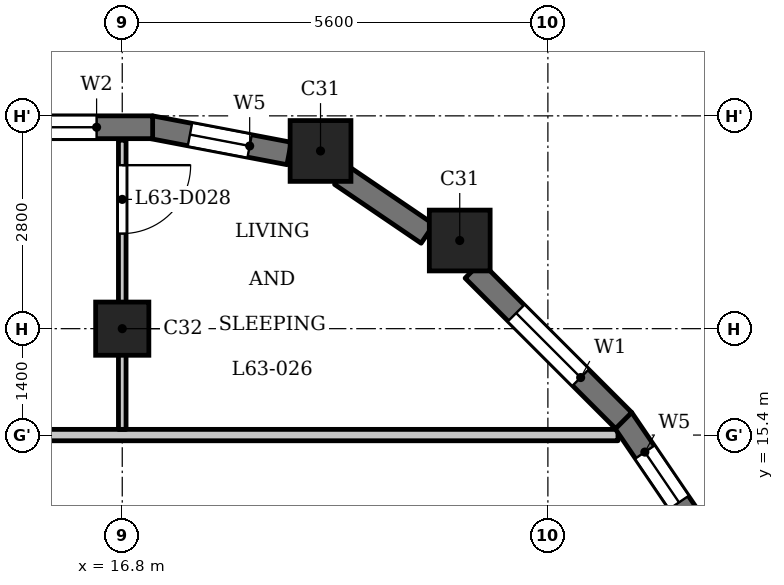
"""IFC4 building model, lengths in metres.
Left out: names, types, materials, properties, quantities, classifications, styles, units other than length and angle.
Written with IfcOpenShell. Run it as: python <this file> out.ifc"""

import sys

from ifc_helpers import new_model, si_unit, direction, frame, frame_2d, origin, origin_2d, place, context, subcontext, project, spatial, rectangle, extrude, element, fill, save


model = new_model("IFC4")
c1 = context("Model", 3, precision=1e-05, world=origin(), true_north=direction((0.0, 1.0)))
c2 = subcontext(c1, "Body", "Model", "MODEL_VIEW")
j1 = project(units=[si_unit("LENGTHUNIT", "METRE"), si_unit("PLANEANGLEUNIT", "RADIAN")], contexts=[c1])
p1 = place(None, origin())
s1 = spatial("IfcSite", under=j1, at=p1, CompositionType="ELEMENT")
p2 = place(p1, origin())
s2 = spatial("IfcBuilding", under=s1, at=p2, CompositionType="ELEMENT")
p3 = place(p2, frame((0.0, 0.0, 245.2)))
s3 = spatial("IfcBuildingStorey", under=s2, at=p3, CompositionType="ELEMENT", Elevation=245.2)
for number, where, z_axis, x_axis in (
    (1, (21.24, 17.96, 0.0), (0.0, 0.0, 1.0), (1.0, 0.0, 0.0)),
    (2, (19.409, 19.138, 0.0), (0.0, 0.0, 1.0), (1.0, 0.0, 0.0)),
):
    element("IfcColumn", number, at=place(p3, frame(where, z_axis=z_axis, x_axis=x_axis)), inside=s3, PredefinedType="COLUMN", context=c2, shape_type="SweptSolid", body=[
        extrude(rectangle(XDim=0.8, YDim=0.8, at=origin_2d()), origin(), (0.0, 0.0, 1.0), 3.5),
    ])
p4 = place(p3, frame((16.8, 16.8, 0.0), z_axis=(0.0, 0.0, 1.0), x_axis=(1.0, 0.0, 0.0)))
e3 = element("IfcColumn", 3, at=p4, inside=s3, PredefinedType="COLUMN", context=c2, shape_type="SweptSolid", body=[
    extrude(rectangle(XDim=0.7, YDim=0.7, at=origin_2d()), origin(), (0.0, 0.0, 1.0), 3.5),
])
p5 = place(p3, frame((24.422, 14.078, 0.0), z_axis=(0.0, 0.0, 1.0), x_axis=(-0.562054549384, 0.827100165347, 0.0)))
e4 = element("IfcWall", 4, at=p5, inside=s3, PredefinedType="SOLIDWALL", context=c2, shape_type="SweptSolid", body=[
    extrude(rectangle(XDim=1.856, YDim=0.3, at=frame_2d((0.928, 0.0))), origin(), (0.0, 0.0, 1.0), 2.55),
])
p6 = place(p5, frame((0.528, 0.0, 0.6)))
e5 = element("IfcOpeningElement", 5, at=p6, cuts=e4, PredefinedType="OPENING", context=c2, shape_type="SweptSolid", body=[
    extrude(rectangle(XDim=0.8, YDim=1.55, at=frame_2d((0.4, 0.775))), frame((0.0, 0.16, 0.0), z_axis=(0.0, -1.0, 0.0), x_axis=(1.0, 0.0, 0.0)), (0.0, 0.0, 1.0), 0.32),
])
p7 = place(p3, frame((23.397, 15.591, 0.0), z_axis=(0.0, 0.0, 1.0), x_axis=(-0.707150377276, 0.707063182409, 0.0)))
e6 = element("IfcWall", 6, at=p7, inside=s3, PredefinedType="SOLIDWALL", context=c2, shape_type="SweptSolid", body=[
    extrude(rectangle(XDim=2.8, YDim=0.3, at=frame_2d((1.4, 0.0))), origin(), (0.0, 0.0, 1.0), 2.55),
])
p8 = place(p7, frame((0.8, 0.0, 0.6)))
e7 = element("IfcOpeningElement", 7, at=p8, cuts=e6, PredefinedType="OPENING", context=c2, shape_type="SweptSolid", body=[
    extrude(rectangle(XDim=1.2, YDim=1.55, at=frame_2d((0.6, 0.775))), frame((0.0, 0.16, 0.0), z_axis=(0.0, -1.0, 0.0), x_axis=(1.0, 0.0, 0.0)), (0.0, 0.0, 1.0), 0.32),
])
p9 = place(p3, frame((20.817, 18.048, 0.0), z_axis=(0.0, 0.0, 1.0), x_axis=(-0.827025410886, 0.562164539747, 0.0)))
e8 = element("IfcWall", 8, at=p9, inside=s3, PredefinedType="SOLIDWALL", context=c2, shape_type="SweptSolid", body=[
    extrude(rectangle(XDim=1.377, YDim=0.3, at=frame_2d((0.688, 0.0))), origin(), (0.0, 0.0, 1.0), 2.55),
])
p10 = place(p3, frame((18.995, 19.105, 0.0), z_axis=(0.0, 0.0, 1.0), x_axis=(-0.982301706131, 0.187305520826, 0.0)))
e9 = element("IfcWall", 9, at=p10, inside=s3, PredefinedType="SOLIDWALL", context=c2, shape_type="SweptSolid", body=[
    extrude(rectangle(XDim=1.856, YDim=0.3, at=frame_2d((0.928, 0.0))), origin(), (0.0, 0.0, 1.0), 2.55),
])
p11 = place(p10, frame((0.528, 0.0, 0.6)))
e10 = element("IfcOpeningElement", 10, at=p11, cuts=e9, PredefinedType="OPENING", context=c2, shape_type="SweptSolid", body=[
    extrude(rectangle(XDim=0.8, YDim=1.55, at=frame_2d((0.4, 0.775))), frame((0.0, 0.16, 0.0), z_axis=(0.0, -1.0, 0.0), x_axis=(1.0, 0.0, 0.0)), (0.0, 0.0, 1.0), 0.32),
])
p12 = place(p3, frame((17.2, 19.45, 0.0), z_axis=(0.0, 0.0, 1.0), x_axis=(-1.0, 0.0, 0.0)))
e11 = element("IfcWall", 11, at=p12, inside=s3, PredefinedType="SOLIDWALL", context=c2, shape_type="SweptSolid", body=[
    extrude(rectangle(XDim=2.8, YDim=0.3, at=frame_2d((1.4, 0.0))), origin(), (0.0, 0.0, 1.0), 2.55),
])
p13 = place(p12, frame((0.738, 0.0, 0.9)))
e12 = element("IfcOpeningElement", 12, at=p13, cuts=e11, PredefinedType="OPENING", context=c2, shape_type="SweptSolid", body=[
    extrude(rectangle(XDim=1.8, YDim=1.25, at=frame_2d((0.9, 0.625))), frame((0.0, 0.16, 0.0), z_axis=(0.0, -1.0, 0.0), x_axis=(1.0, 0.0, 0.0)), (0.0, 0.0, 1.0), 0.32),
])
p14 = place(p3, frame((-23.55, 15.4, 0.0), z_axis=(0.0, 0.0, 1.0), x_axis=(1.0, 0.0, 0.0)))
e13 = element("IfcWall", 13, at=p14, inside=s3, PredefinedType="PARTITIONING", context=c2, shape_type="SweptSolid", body=[
    extrude(rectangle(XDim=46.872, YDim=0.15, at=frame_2d((23.436, 0.0))), origin(), (0.0, 0.0, 1.0), 3.2),
])
p15 = place(p14, frame((12.9, 0.0, 0.0)))
e14 = element("IfcOpeningElement", 14, at=p15, cuts=e13, PredefinedType="OPENING", context=c2, shape_type="SweptSolid", body=[
    extrude(rectangle(XDim=1.0, YDim=2.1, at=frame_2d((0.5, 1.05))), frame((0.0, 0.085, 0.0), z_axis=(0.0, -1.0, 0.0), x_axis=(1.0, 0.0, 0.0)), (0.0, 0.0, 1.0), 0.17),
])
p16 = place(p14, frame((20.9, 0.0, 0.0)))
e15 = element("IfcOpeningElement", 15, at=p16, cuts=e13, PredefinedType="OPENING", context=c2, shape_type="SweptSolid", body=[
    extrude(rectangle(XDim=1.0, YDim=2.1, at=frame_2d((0.5, 1.05))), frame((0.0, 0.085, 0.0), z_axis=(0.0, -1.0, 0.0), x_axis=(1.0, 0.0, 0.0)), (0.0, 0.0, 1.0), 0.17),
])
p17 = place(p14, frame((37.7, 0.0, 0.0)))
e16 = element("IfcOpeningElement", 16, at=p17, cuts=e13, PredefinedType="OPENING", context=c2, shape_type="SweptSolid", body=[
    extrude(rectangle(XDim=1.0, YDim=2.1, at=frame_2d((0.5, 1.05))), frame((0.0, 0.085, 0.0), z_axis=(0.0, -1.0, 0.0), x_axis=(1.0, 0.0, 0.0)), (0.0, 0.0, 1.0), 0.17),
])
p18 = place(p3, frame((16.8, 15.475, 0.0), z_axis=(0.0, 0.0, 1.0), x_axis=(0.0, 1.0, 0.0)))
e17 = element("IfcWall", 17, at=p18, inside=s3, PredefinedType="PARTITIONING", context=c2, shape_type="SweptSolid", body=[
    extrude(rectangle(XDim=3.805, YDim=0.1, at=frame_2d((1.902, 0.0))), origin(), (0.0, 0.0, 1.0), 3.2),
])
p19 = place(p18, frame((2.576, 0.0, 0.0)))
e18 = element("IfcOpeningElement", 18, at=p19, cuts=e17, PredefinedType="OPENING", context=c2, shape_type="SweptSolid", body=[
    extrude(rectangle(XDim=0.9, YDim=2.1, at=frame_2d((0.45, 1.05))), frame((0.0, 0.06, 0.0), z_axis=(0.0, -1.0, 0.0), x_axis=(1.0, 0.0, 0.0)), (0.0, 0.0, 1.0), 0.12),
])
p20 = place(p19, origin())
e19 = element("IfcDoor", 19, at=p20, inside=s3, OperationType="SINGLE_SWING_RIGHT", PredefinedType="DOOR", context=c2, shape_type="SweptSolid", body=[
    extrude(rectangle(XDim=0.9, YDim=2.1, at=frame_2d((0.45, 1.05))), frame((0.0, 0.025, 0.0), z_axis=(0.0, -1.0, 0.0), x_axis=(1.0, 0.0, 0.0)), (0.0, 0.0, 1.0), 0.05),
])
fill(e18, e19)
p21 = place(p6, origin())
e20 = element("IfcWindow", 20, at=p21, inside=s3, PartitioningType="SINGLE_PANEL", PredefinedType="WINDOW", context=c2, shape_type="SweptSolid", body=[
    extrude(rectangle(XDim=0.8, YDim=1.55, at=frame_2d((0.4, 0.775))), frame((0.0, 0.03, 0.0), z_axis=(0.0, -1.0, 0.0), x_axis=(1.0, 0.0, 0.0)), (0.0, 0.0, 1.0), 0.06),
])
fill(e5, e20)
p22 = place(p8, origin())
e21 = element("IfcWindow", 21, at=p22, inside=s3, PartitioningType="SINGLE_PANEL", PredefinedType="WINDOW", context=c2, shape_type="SweptSolid", body=[
    extrude(rectangle(XDim=1.2, YDim=1.55, at=frame_2d((0.6, 0.775))), frame((0.0, 0.03, 0.0), z_axis=(0.0, -1.0, 0.0), x_axis=(1.0, 0.0, 0.0)), (0.0, 0.0, 1.0), 0.06),
])
fill(e7, e21)
p23 = place(p11, origin())
e22 = element("IfcWindow", 22, at=p23, inside=s3, PartitioningType="SINGLE_PANEL", PredefinedType="WINDOW", context=c2, shape_type="SweptSolid", body=[
    extrude(rectangle(XDim=0.8, YDim=1.55, at=frame_2d((0.4, 0.775))), frame((0.0, 0.03, 0.0), z_axis=(0.0, -1.0, 0.0), x_axis=(1.0, 0.0, 0.0)), (0.0, 0.0, 1.0), 0.06),
])
fill(e10, e22)
p24 = place(p13, origin())
e23 = element("IfcWindow", 23, at=p24, inside=s3, PartitioningType="SINGLE_PANEL", PredefinedType="WINDOW", context=c2, shape_type="SweptSolid", body=[
    extrude(rectangle(XDim=1.8, YDim=1.25, at=frame_2d((0.9, 0.625))), frame((0.0, 0.03, 0.0), z_axis=(0.0, -1.0, 0.0), x_axis=(1.0, 0.0, 0.0)), (0.0, 0.0, 1.0), 0.06),
])
fill(e12, e23)
save(model, sys.argv[1])
